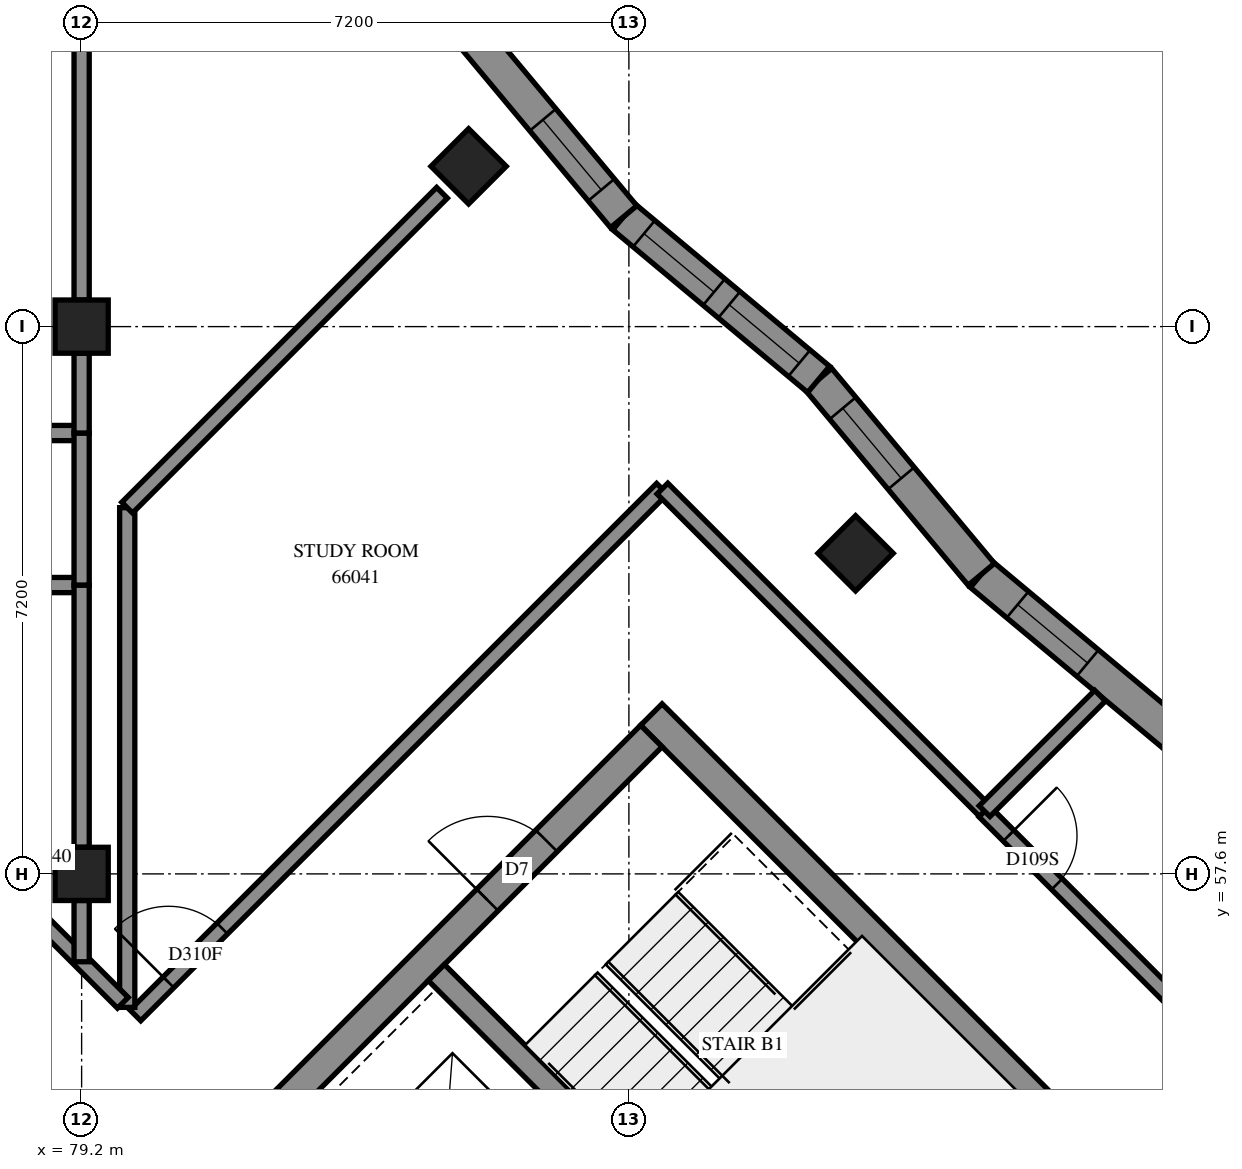
"""IFC4 building model, lengths in metres.
Left out: names, types, materials, properties, quantities, classifications, styles, units other than length and angle.
Written with IfcOpenShell. Run it as: python <this file> out.ifc"""

import sys

from ifc_helpers import new_model, si_unit, direction, frame, frame_2d, origin, origin_2d, place, context, subcontext, project, spatial, polyline, rectangle, outline, extrude, element, fill, save


model = new_model("IFC4")
c1 = context("Model", 3, precision=1e-05, world=origin(), true_north=direction((0.0, 1.0)))
c2 = subcontext(c1, "Body", "Model", "MODEL_VIEW")
j1 = project(units=[si_unit("LENGTHUNIT", "METRE"), si_unit("PLANEANGLEUNIT", "RADIAN")], contexts=[c1])
p1 = place(None, origin())
s1 = spatial("IfcSite", under=j1, at=p1, CompositionType="ELEMENT")
p2 = place(p1, origin())
s2 = spatial("IfcBuilding", under=s1, at=p2, CompositionType="ELEMENT")
p3 = place(p2, frame((0.0, 0.0, 243.8)))
s3 = spatial("IfcBuildingStorey", under=s2, at=p3, CompositionType="ELEMENT", Elevation=243.8)
for number, where, z_axis, x_axis in (
    (1, (79.2, 57.6, 0.0), (0.0, 0.0, 1.0), (1.0, 0.0, 0.0)),
    (2, (79.2, 64.8, 0.0), (0.0, 0.0, 1.0), (1.0, 0.0, 0.0)),
    (3, (84.291, 66.909, 0.0), (0.0, 0.0, 1.0), (0.707, -0.707, 0.0)),
    (4, (89.382, 61.818, 0.0), (0.0, 0.0, 1.0), (0.707, -0.707, 0.0)),
):
    element("IfcColumn", number, at=place(p3, frame(where, z_axis=z_axis, x_axis=x_axis)), inside=s3, PredefinedType="COLUMN", context=c2, shape_type="SweptSolid", body=[
        extrude(rectangle(XDim=0.7, YDim=0.7, at=origin_2d()), origin(), (0.0, 0.0, 1.0), 3.1),
    ])
p4 = place(p3, frame((86.695, 59.696, -0.3), z_axis=(0.0, 0.0, 1.0), x_axis=(0.7071100706, -0.7071034917, 0.0)))
e5 = element("IfcWall", 5, at=p4, inside=s3, PredefinedType="SHEAR", context=c2, shape_type="SweptSolid", body=[
    extrude(rectangle(XDim=15.2, YDim=0.4, at=frame_2d((7.6, 0.0))), origin(), (0.0, 0.0, 1.0), 2.7),
])
p5 = place(p4, frame((10.4, 0.0, 0.3)))
e6 = element("IfcOpeningElement", 6, at=p5, cuts=e5, PredefinedType="OPENING", context=c2, shape_type="SweptSolid", body=[
    extrude(rectangle(XDim=0.8, YDim=2.1, at=frame_2d((0.4, 1.05))), frame((0.0, 0.21, 0.0), z_axis=(0.0, -1.0, 0.0), x_axis=(1.0, 0.0, 0.0)), (0.0, 0.0, 1.0), 0.42),
])
p6 = place(p3, frame((76.513, 49.231, -0.3), z_axis=(0.0, 0.0, 1.0), x_axis=(0.7071067812, 0.7071067812, 0.0)))
e7 = element("IfcWall", 7, at=p6, inside=s3, PredefinedType="SHEAR", context=c2, shape_type="SweptSolid", body=[
    extrude(rectangle(XDim=14.4, YDim=0.4, at=frame_2d((7.2, 0.0))), origin(), (0.0, 0.0, 1.0), 2.7),
])
p7 = place(p6, frame((4.55, 0.0, 0.3)))
e8 = element("IfcOpeningElement", 8, at=p7, cuts=e7, PredefinedType="OPENING", context=c2, shape_type="SweptSolid", body=[
    extrude(rectangle(XDim=1.1, YDim=2.1, at=frame_2d((0.55, 1.05))), frame((0.0, 0.21, 0.0), z_axis=(0.0, -1.0, 0.0), x_axis=(1.0, 0.0, 0.0)), (0.0, 0.0, 1.0), 0.42),
])
p8 = place(p6, frame((11.35, 0.0, 0.3)))
e9 = element("IfcOpeningElement", 9, at=p8, cuts=e7, PredefinedType="OPENING", context=c2, shape_type="SweptSolid", body=[
    extrude(rectangle(XDim=1.1, YDim=2.1, at=frame_2d((0.55, 1.05))), frame((0.0, 0.21, 0.0), z_axis=(0.0, -1.0, 0.0), x_axis=(1.0, 0.0, 0.0)), (0.0, 0.0, 1.0), 0.42),
])
p9 = place(p3, frame((83.867, 56.302, 0.0), z_axis=(0.0, 0.0, 1.0), x_axis=(0.7071137256, -0.7070998367, 0.0)))
e10 = element("IfcWall", 10, at=p9, inside=s3, PredefinedType="SOLIDWALL", context=c2, shape_type="SweptSolid", body=[
    extrude(rectangle(XDim=7.2, YDim=0.3, at=frame_2d((3.6, 0.0))), origin(), (0.0, 0.0, 1.0), 3.1),
])
p10 = place(p3, frame((93.601, 59.401, 0.0), z_axis=(0.0, 0.0, 1.0), x_axis=(-0.7677573222, 0.6407407387, 0.0)))
e11 = element("IfcWall", 11, at=p10, inside=s3, PredefinedType="SOLIDWALL", context=c2, shape_type="SweptSolid", body=[
    extrude(outline(polyline([(-0.02, -0.225), (3.32, -0.225), (3.361, 0.225), (0.02, 0.225), (-0.02, -0.225)])), origin(), (0.0, 0.0, 1.0), 3.1),
])
p11 = place(p10, frame((1.518, 0.0, 0.45)))
e12 = element("IfcOpeningElement", 12, at=p11, cuts=e11, PredefinedType="OPENING", context=c2, shape_type="SweptSolid", body=[
    extrude(rectangle(XDim=1.2, YDim=2.55, at=frame_2d((0.6, 1.275))), frame((0.0, 0.235, 0.0), z_axis=(0.0, -1.0, 0.0), x_axis=(1.0, 0.0, 0.0)), (0.0, 0.0, 1.0), 0.47),
])
p12 = place(p3, frame((91.036, 61.541, 0.0), z_axis=(0.0, 0.0, 1.0), x_axis=(-0.6407407387, 0.7677573222, 0.0)))
e13 = element("IfcWall", 13, at=p12, inside=s3, PredefinedType="SOLIDWALL", context=c2, shape_type="SweptSolid", body=[
    extrude(outline(polyline([(0.02, -0.225), (3.361, -0.225), (3.32, 0.225), (-0.02, 0.225), (0.02, -0.225)])), origin(), (0.0, 0.0, 1.0), 3.1),
])
p13 = place(p12, frame((1.645, 0.0, 0.45)))
e14 = element("IfcOpeningElement", 14, at=p13, cuts=e13, PredefinedType="OPENING", context=c2, shape_type="SweptSolid", body=[
    extrude(rectangle(XDim=1.2, YDim=2.55, at=frame_2d((0.6, 1.275))), frame((0.0, 0.235, 0.0), z_axis=(0.0, -1.0, 0.0), x_axis=(1.0, 0.0, 0.0)), (0.0, 0.0, 1.0), 0.47),
])
p14 = place(p3, frame((88.896, 64.106, 0.0), z_axis=(0.0, 0.0, 1.0), x_axis=(-0.7677573222, 0.6407407387, 0.0)))
e15 = element("IfcWall", 15, at=p14, inside=s3, PredefinedType="SOLIDWALL", context=c2, shape_type="SweptSolid", body=[
    extrude(outline(polyline([(-0.02, -0.225), (3.32, -0.225), (3.361, 0.225), (0.02, 0.225), (-0.02, -0.225)])), origin(), (0.0, 0.0, 1.0), 3.1),
])
p15 = place(p14, frame((0.333, 0.0, 0.45)))
e16 = element("IfcOpeningElement", 16, at=p15, cuts=e15, PredefinedType="OPENING", context=c2, shape_type="SweptSolid", body=[
    extrude(rectangle(XDim=1.2, YDim=2.55, at=frame_2d((0.6, 1.275))), frame((0.0, 0.235, 0.0), z_axis=(0.0, -1.0, 0.0), x_axis=(1.0, 0.0, 0.0)), (0.0, 0.0, 1.0), 0.47),
])
p16 = place(p14, frame((1.793, 0.0, 0.45)))
e17 = element("IfcOpeningElement", 17, at=p16, cuts=e15, PredefinedType="OPENING", context=c2, shape_type="SweptSolid", body=[
    extrude(rectangle(XDim=1.2, YDim=2.55, at=frame_2d((0.6, 1.275))), frame((0.0, 0.235, 0.0), z_axis=(0.0, -1.0, 0.0), x_axis=(1.0, 0.0, 0.0)), (0.0, 0.0, 1.0), 0.47),
])
p17 = place(p3, frame((86.331, 66.246, 0.0), z_axis=(0.0, 0.0, 1.0), x_axis=(-0.6407554652, 0.7677450318, 0.0)))
e18 = element("IfcWall", 18, at=p17, inside=s3, PredefinedType="SOLIDWALL", context=c2, shape_type="SweptSolid", body=[
    extrude(outline(polyline([(0.02, -0.225), (3.361, -0.225), (3.32, 0.225), (-0.02, 0.225), (0.02, -0.225)])), origin(), (0.0, 0.0, 1.0), 3.1),
])
p18 = place(p17, frame((0.459, 0.0, 0.45)))
e19 = element("IfcOpeningElement", 19, at=p18, cuts=e18, PredefinedType="OPENING", context=c2, shape_type="SweptSolid", body=[
    extrude(rectangle(XDim=1.2, YDim=2.55, at=frame_2d((0.6, 1.275))), frame((0.0, 0.235, 0.0), z_axis=(0.0, -1.0, 0.0), x_axis=(1.0, 0.0, 0.0)), (0.0, 0.0, 1.0), 0.47),
])
p19 = place(p3, frame((79.907, 55.739, 0.0), z_axis=(0.0, 0.0, 1.0), x_axis=(0.7071067812, 0.7071067812, 0.0)))
e20 = element("IfcWall", 20, at=p19, inside=s3, PredefinedType="PARTITIONING", context=c2, shape_type="SweptSolid", body=[
    extrude(rectangle(XDim=9.798, YDim=0.2, at=frame_2d((4.899, 0.0))), origin(), (0.0, 0.0, 1.0), 3.1),
])
p20 = place(p19, frame((0.616, 0.0, 0.0)))
e21 = element("IfcOpeningElement", 21, at=p20, cuts=e20, PredefinedType="OPENING", context=c2, shape_type="SweptSolid", body=[
    extrude(rectangle(XDim=1.0, YDim=2.1, at=frame_2d((0.5, 1.05))), frame((0.0, 0.11, 0.0), z_axis=(0.0, -1.0, 0.0), x_axis=(1.0, 0.0, 0.0)), (0.0, 0.0, 1.0), 0.22),
])
p21 = place(p3, frame((79.8, 55.844, 0.0), z_axis=(0.0, 0.0, 1.0), x_axis=(0.0, 1.0, 0.0)))
e22 = element("IfcWall", 22, at=p21, inside=s3, PredefinedType="PARTITIONING", context=c2, shape_type="SweptSolid", body=[
    extrude(rectangle(XDim=6.574, YDim=0.2, at=frame_2d((3.287, 0.0))), origin(), (0.0, 0.0, 1.0), 3.1),
])
p22 = place(p3, frame((79.2, 65.15, 0.0), z_axis=(0.0, 0.0, 1.0), x_axis=(0.0, 1.0, 0.0)))
e23 = element("IfcWall", 23, at=p22, inside=s3, PredefinedType="PARTITIONING", context=c2, shape_type="SweptSolid", body=[
    extrude(rectangle(XDim=6.5, YDim=0.2, at=frame_2d((3.25, 0.0))), origin(), (0.0, 0.0, 1.0), 3.1),
])
p23 = place(p3, frame((86.841, 62.669, 0.0), z_axis=(0.0, 0.0, 1.0), x_axis=(0.7071067812, -0.7071067812, 0.0)))
e24 = element("IfcWall", 24, at=p23, inside=s3, PredefinedType="PARTITIONING", context=c2, shape_type="SweptSolid", body=[
    extrude(rectangle(XDim=5.999, YDim=0.2, at=frame_2d((3.0, 0.0))), origin(), (0.0, 0.0, 1.0), 3.1),
])
p24 = place(p3, frame((79.799, 62.419, 0.0), z_axis=(0.0, 0.0, 1.0), x_axis=(0.7071067812, 0.7071067812, 0.0)))
e25 = element("IfcWall", 25, at=p24, inside=s3, PredefinedType="PARTITIONING", context=c2, shape_type="SweptSolid", body=[
    extrude(rectangle(XDim=5.858, YDim=0.2, at=frame_2d((2.929, 0.0))), origin(), (0.0, 0.0, 1.0), 3.1),
])
p25 = place(p3, frame((74.246, 61.4, 0.0), z_axis=(0.0, 0.0, 1.0), x_axis=(1.0, 0.0, 0.0)))
e26 = element("IfcWall", 26, at=p25, inside=s3, PredefinedType="PARTITIONING", context=c2, shape_type="SweptSolid", body=[
    extrude(rectangle(XDim=4.954, YDim=0.2, at=frame_2d((2.477, 0.0))), origin(), (0.0, 0.0, 1.0), 3.1),
])
p26 = place(p25, frame((1.17, 0.0, 0.0)))
e27 = element("IfcOpeningElement", 27, at=p26, cuts=e26, PredefinedType="OPENING", context=c2, shape_type="SweptSolid", body=[
    extrude(rectangle(XDim=1.0, YDim=2.1, at=frame_2d((0.5, 1.05))), frame((0.0, 0.11, 0.0), z_axis=(0.0, -1.0, 0.0), x_axis=(1.0, 0.0, 0.0)), (0.0, 0.0, 1.0), 0.22),
])
p27 = place(p3, frame((74.402, 63.4, 0.0), z_axis=(0.0, 0.0, 1.0), x_axis=(1.0, 0.0, 0.0)))
e28 = element("IfcWall", 28, at=p27, inside=s3, PredefinedType="PARTITIONING", context=c2, shape_type="SweptSolid", body=[
    extrude(rectangle(XDim=4.798, YDim=0.2, at=frame_2d((2.399, 0.0))), origin(), (0.0, 0.0, 1.0), 3.1),
])
p28 = place(p27, frame((1.723, 0.0, 0.0)))
e29 = element("IfcOpeningElement", 29, at=p28, cuts=e28, PredefinedType="OPENING", context=c2, shape_type="SweptSolid", body=[
    extrude(rectangle(XDim=1.0, YDim=2.1, at=frame_2d((0.5, 1.05))), frame((0.0, 0.11, 0.0), z_axis=(0.0, -1.0, 0.0), x_axis=(1.0, 0.0, 0.0)), (0.0, 0.0, 1.0), 0.22),
])
p29 = place(p3, frame((76.513, 59.131, 0.0), z_axis=(0.0, 0.0, 1.0), x_axis=(0.7073586681, -0.7068548045, 0.0)))
e30 = element("IfcWall", 30, at=p29, inside=s3, PredefinedType="PARTITIONING", context=c2, shape_type="SweptSolid", body=[
    extrude(rectangle(XDim=4.565, YDim=0.2, at=frame_2d((2.282, 0.0))), origin(), (0.0, 0.0, 1.0), 3.1),
])
p30 = place(p3, frame((91.077, 58.421, 0.0), z_axis=(0.0, 0.0, 1.0), x_axis=(0.7068288851, -0.7073845681, 0.0)))
e31 = element("IfcWall", 31, at=p30, inside=s3, PredefinedType="PARTITIONING", context=c2, shape_type="SweptSolid", body=[
    extrude(rectangle(XDim=3.599, YDim=0.2, at=frame_2d((1.8, 0.0))), origin(), (0.0, 0.0, 1.0), 3.1),
])
p31 = place(p30, frame((0.451, 0.0, 0.0)))
e32 = element("IfcOpeningElement", 32, at=p31, cuts=e31, PredefinedType="OPENING", context=c2, shape_type="SweptSolid", body=[
    extrude(rectangle(XDim=0.9, YDim=2.1, at=frame_2d((0.45, 1.05))), frame((0.0, 0.11, 0.0), z_axis=(0.0, -1.0, 0.0), x_axis=(1.0, 0.0, 0.0)), (0.0, 0.0, 1.0), 0.22),
])
p32 = place(p3, frame((79.2, 57.95, 0.0), z_axis=(0.0, 0.0, 1.0), x_axis=(0.0, 1.0, 0.0)))
e33 = element("IfcWall", 33, at=p32, inside=s3, PredefinedType="PARTITIONING", context=c2, shape_type="SweptSolid", body=[
    extrude(rectangle(XDim=3.45, YDim=0.2, at=frame_2d((1.725, 0.0))), origin(), (0.0, 0.0, 1.0), 3.1),
])
p33 = place(p3, frame((91.079, 58.425, 0.0), z_axis=(0.0, 0.0, 1.0), x_axis=(0.7071067812, 0.7071067812, 0.0)))
e34 = element("IfcWall", 34, at=p33, inside=s3, PredefinedType="PARTITIONING", context=c2, shape_type="SweptSolid", body=[
    extrude(rectangle(XDim=2.149, YDim=0.2, at=frame_2d((1.074, 0.0))), origin(), (0.0, 0.0, 1.0), 3.1),
])
p34 = place(p3, frame((79.2, 61.4, 0.0), z_axis=(0.0, 0.0, 1.0), x_axis=(0.0, 1.0, 0.0)))
e35 = element("IfcWall", 35, at=p34, inside=s3, PredefinedType="PARTITIONING", context=c2, shape_type="SweptSolid", body=[
    extrude(rectangle(XDim=2.0, YDim=0.2, at=frame_2d((1.0, 0.0))), origin(), (0.0, 0.0, 1.0), 3.1),
])
p35 = place(p3, frame((79.2, 63.4, 0.0), z_axis=(0.0, 0.0, 1.0), x_axis=(0.0, 1.0, 0.0)))
e36 = element("IfcWall", 36, at=p35, inside=s3, PredefinedType="PARTITIONING", context=c2, shape_type="SweptSolid", body=[
    extrude(rectangle(XDim=1.05, YDim=0.2, at=frame_2d((0.525, 0.0))), origin(), (0.0, 0.0, 1.0), 3.1),
])
p36 = place(p3, frame((79.2, 56.444, 0.0), z_axis=(0.0, 0.0, 1.0), x_axis=(0.0, 1.0, 0.0)))
e37 = element("IfcWall", 37, at=p36, inside=s3, PredefinedType="PARTITIONING", context=c2, shape_type="SweptSolid", body=[
    extrude(rectangle(XDim=0.806, YDim=0.2, at=frame_2d((0.403, 0.0))), origin(), (0.0, 0.0, 1.0), 3.1),
])
p37 = place(p11, origin())
e38 = element("IfcWindow", 38, at=p37, inside=s3, PartitioningType="SINGLE_PANEL", PredefinedType="WINDOW", context=c2, shape_type="SweptSolid", body=[
    extrude(rectangle(XDim=1.2, YDim=2.55, at=frame_2d((0.6, 1.275))), frame((0.0, 0.205, 0.0), z_axis=(0.0, -1.0, 0.0), x_axis=(1.0, 0.0, 0.0)), (0.0, 0.0, 1.0), 0.06),
])
fill(e12, e38)
p38 = place(p13, origin())
e39 = element("IfcWindow", 39, at=p38, inside=s3, PartitioningType="SINGLE_PANEL", PredefinedType="WINDOW", context=c2, shape_type="SweptSolid", body=[
    extrude(rectangle(XDim=1.2, YDim=2.55, at=frame_2d((0.6, 1.275))), frame((0.0, 0.205, 0.0), z_axis=(0.0, -1.0, 0.0), x_axis=(1.0, 0.0, 0.0)), (0.0, 0.0, 1.0), 0.06),
])
fill(e14, e39)
p39 = place(p15, origin())
e40 = element("IfcWindow", 40, at=p39, inside=s3, PartitioningType="SINGLE_PANEL", PredefinedType="WINDOW", context=c2, shape_type="SweptSolid", body=[
    extrude(rectangle(XDim=1.2, YDim=2.55, at=frame_2d((0.6, 1.275))), frame((0.0, 0.205, 0.0), z_axis=(0.0, -1.0, 0.0), x_axis=(1.0, 0.0, 0.0)), (0.0, 0.0, 1.0), 0.06),
])
fill(e16, e40)
p40 = place(p16, origin())
e41 = element("IfcWindow", 41, at=p40, inside=s3, PartitioningType="SINGLE_PANEL", PredefinedType="WINDOW", context=c2, shape_type="SweptSolid", body=[
    extrude(rectangle(XDim=1.2, YDim=2.55, at=frame_2d((0.6, 1.275))), frame((0.0, 0.205, 0.0), z_axis=(0.0, -1.0, 0.0), x_axis=(1.0, 0.0, 0.0)), (0.0, 0.0, 1.0), 0.06),
])
fill(e17, e41)
p41 = place(p18, origin())
e42 = element("IfcWindow", 42, at=p41, inside=s3, PartitioningType="SINGLE_PANEL", PredefinedType="WINDOW", context=c2, shape_type="SweptSolid", body=[
    extrude(rectangle(XDim=1.2, YDim=2.55, at=frame_2d((0.6, 1.275))), frame((0.0, 0.205, 0.0), z_axis=(0.0, -1.0, 0.0), x_axis=(1.0, 0.0, 0.0)), (0.0, 0.0, 1.0), 0.06),
])
fill(e19, e42)
p42 = place(p8, origin())
e43 = element("IfcDoor", 43, at=p42, inside=s3, OperationType="SINGLE_SWING_LEFT", PredefinedType="DOOR", context=c2, shape_type="SweptSolid", body=[
    extrude(rectangle(XDim=1.1, YDim=2.1, at=frame_2d((0.55, 1.05))), frame((0.0, 0.025, 0.0), z_axis=(0.0, -1.0, 0.0), x_axis=(1.0, 0.0, 0.0)), (0.0, 0.0, 1.0), 0.05),
])
fill(e9, e43)
p43 = place(p20, origin())
e44 = element("IfcDoor", 44, at=p43, inside=s3, OperationType="SINGLE_SWING_LEFT", PredefinedType="DOOR", context=c2, shape_type="SweptSolid", body=[
    extrude(rectangle(XDim=1.0, YDim=2.1, at=frame_2d((0.5, 1.05))), frame((0.0, 0.025, 0.0), z_axis=(0.0, -1.0, 0.0), x_axis=(1.0, 0.0, 0.0)), (0.0, 0.0, 1.0), 0.05),
])
fill(e21, e44)
p44 = place(p31, origin())
e45 = element("IfcDoor", 45, at=p44, inside=s3, OperationType="SINGLE_SWING_RIGHT", PredefinedType="DOOR", context=c2, shape_type="SweptSolid", body=[
    extrude(rectangle(XDim=0.9, YDim=2.1, at=frame_2d((0.45, 1.05))), frame((0.0, 0.025, 0.0), z_axis=(0.0, -1.0, 0.0), x_axis=(1.0, 0.0, 0.0)), (0.0, 0.0, 1.0), 0.05),
])
fill(e32, e45)
save(model, sys.argv[1])
